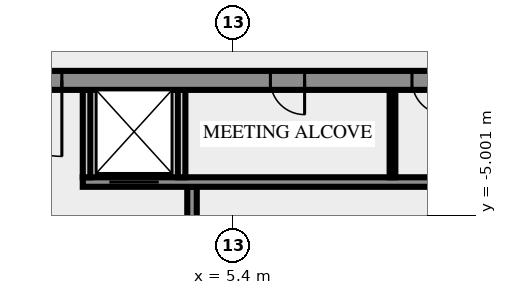
"""IFC4 building model, lengths in metres.
Left out: names, types, materials, properties, quantities, classifications, styles, units other than length and angle.
Written with IfcOpenShell. Run it as: python <this file> out.ifc"""

import sys

from ifc_helpers import new_model, si_unit, direction, frame, frame_2d, origin, place, context, subcontext, project, spatial, rectangle, extrude, element, fill, save


model = new_model("IFC4")
c1 = context("Model", 3, precision=1e-05, world=origin(), true_north=direction((0.0, 1.0)))
c2 = subcontext(c1, "Body", "Model", "MODEL_VIEW")
j1 = project(units=[si_unit("LENGTHUNIT", "METRE"), si_unit("PLANEANGLEUNIT", "RADIAN")], contexts=[c1])
p1 = place(None, origin())
s1 = spatial("IfcSite", under=j1, at=p1, CompositionType="ELEMENT")
p2 = place(p1, origin())
s2 = spatial("IfcBuilding", under=s1, at=p2, CompositionType="ELEMENT")
p3 = place(p2, frame((0.0, 0.0, 269.0)))
s3 = spatial("IfcBuildingStorey", under=s2, at=p3, CompositionType="ELEMENT", Elevation=269.0)
p4 = place(p3, frame((4.325, -7.25, 0.0), z_axis=(0.0, 0.0, 1.0), x_axis=(0.0, 1.0, 0.0)))
e1 = element("IfcWall", 1, at=p4, inside=s3, PredefinedType="SHEAR", context=c2, shape_type="SweptSolid", body=[
    extrude(rectangle(XDim=3.0, YDim=0.25, at=frame_2d((1.5, 0.0))), origin(), (0.0, 0.0, 1.0), 3.5),
])
p5 = place(p4, frame((0.8, 0.0, 0.0)))
e2 = element("IfcOpeningElement", 2, at=p5, cuts=e1, PredefinedType="OPENING", context=c2, shape_type="SweptSolid", body=[
    extrude(rectangle(XDim=1.4, YDim=2.1, at=frame_2d((0.7, 1.05))), frame((0.0, 0.135, 0.0), z_axis=(0.0, -1.0, 0.0), x_axis=(1.0, 0.0, 0.0)), (0.0, 0.0, 1.0), 0.27),
])
p6 = place(p3, frame((1.45, -4.125, 0.0), z_axis=(0.0, 0.0, 1.0), x_axis=(1.0, 0.0, 0.0)))
e3 = element("IfcWall", 3, at=p6, inside=s3, PredefinedType="SHEAR", context=c2, shape_type="SweptSolid", body=[
    extrude(rectangle(XDim=12.9, YDim=0.25, at=frame_2d((6.45, 0.0))), origin(), (0.0, 0.0, 1.0), 3.5),
])
p7 = place(p6, frame((0.7, 0.0, 0.0)))
e4 = element("IfcOpeningElement", 4, at=p7, cuts=e3, PredefinedType="OPENING", context=c2, shape_type="SweptSolid", body=[
    extrude(rectangle(XDim=1.3, YDim=2.1, at=frame_2d((0.65, 1.05))), frame((0.0, 0.135, 0.0), z_axis=(0.0, -1.0, 0.0), x_axis=(1.0, 0.0, 0.0)), (0.0, 0.0, 1.0), 0.27),
])
for number, where, z_axis, x_axis in (
    (5, (1.55, -4.0, 0.0), (0.0, 0.0, 1.0), (0.0, 1.0, 0.0)),
    (6, (4.05, -4.0, 0.0), (0.0, 0.0, 1.0), (0.0, 1.0, 0.0)),
):
    element("IfcWall", number, at=place(p3, frame(where, z_axis=z_axis, x_axis=x_axis)), inside=s3, PredefinedType="SOLIDWALL", context=c2, shape_type="SweptSolid", body=[
        extrude(rectangle(XDim=2.3, YDim=0.2, at=frame_2d((1.15, 0.0))), origin(), (0.0, 0.0, 1.0), 3.5),
    ])
p8 = place(p3, frame((9.6, -4.0, 0.0), z_axis=(0.0, 0.0, 1.0), x_axis=(0.0, 1.0, 0.0)))
e7 = element("IfcWall", 7, at=p8, inside=s3, PredefinedType="PARTITIONING", context=c2, shape_type="SweptSolid", body=[
    extrude(rectangle(XDim=2.3, YDim=0.15, at=frame_2d((1.15, 0.0))), origin(), (0.0, 0.0, 1.0), 3.5),
])
p9 = place(p3, frame((20.49, -1.45, 0.0), z_axis=(0.0, 0.0, 1.0), x_axis=(-1.0, 0.0, 0.0)))
e8 = element("IfcWall", 8, at=p9, inside=s3, PredefinedType="SHEAR", context=c2, shape_type="SweptSolid", body=[
    extrude(rectangle(XDim=40.98, YDim=0.5, at=frame_2d((20.49, 0.0))), origin(), (0.0, 0.0, 1.0), 3.5),
])
p10 = place(p9, frame((38.14, 0.0, 0.0)))
e9 = element("IfcOpeningElement", 9, at=p10, cuts=e8, PredefinedType="OPENING", context=c2, shape_type="SweptSolid", body=[
    extrude(rectangle(XDim=1.8, YDim=2.1, at=frame_2d((0.9, 1.05))), frame((0.0, 0.26, 0.0), z_axis=(0.0, -1.0, 0.0), x_axis=(1.0, 0.0, 0.0)), (0.0, 0.0, 1.0), 0.52),
])
p11 = place(p9, frame((36.728, 0.0, 0.0)))
e10 = element("IfcOpeningElement", 10, at=p11, cuts=e8, PredefinedType="OPENING", context=c2, shape_type="SweptSolid", body=[
    extrude(rectangle(XDim=0.8, YDim=2.1, at=frame_2d((0.4, 1.05))), frame((0.0, 0.26, 0.0), z_axis=(0.0, -1.0, 0.0), x_axis=(1.0, 0.0, 0.0)), (0.0, 0.0, 1.0), 0.52),
])
p12 = place(p9, frame((35.153, 0.0, 0.0)))
e11 = element("IfcOpeningElement", 11, at=p12, cuts=e8, PredefinedType="OPENING", context=c2, shape_type="SweptSolid", body=[
    extrude(rectangle(XDim=0.8, YDim=2.1, at=frame_2d((0.4, 1.05))), frame((0.0, 0.26, 0.0), z_axis=(0.0, -1.0, 0.0), x_axis=(1.0, 0.0, 0.0)), (0.0, 0.0, 1.0), 0.52),
])
p13 = place(p9, frame((32.94, 0.0, 0.0)))
e12 = element("IfcOpeningElement", 12, at=p13, cuts=e8, PredefinedType="OPENING", context=c2, shape_type="SweptSolid", body=[
    extrude(rectangle(XDim=0.9, YDim=2.1, at=frame_2d((0.45, 1.05))), frame((0.0, 0.26, 0.0), z_axis=(0.0, -1.0, 0.0), x_axis=(1.0, 0.0, 0.0)), (0.0, 0.0, 1.0), 0.52),
])
p14 = place(p9, frame((31.015, 0.0, 0.0)))
e13 = element("IfcOpeningElement", 13, at=p14, cuts=e8, PredefinedType="OPENING", context=c2, shape_type="SweptSolid", body=[
    extrude(rectangle(XDim=0.8, YDim=2.1, at=frame_2d((0.4, 1.05))), frame((0.0, 0.26, 0.0), z_axis=(0.0, -1.0, 0.0), x_axis=(1.0, 0.0, 0.0)), (0.0, 0.0, 1.0), 0.52),
])
p15 = place(p9, frame((24.765, 0.0, 0.0)))
e14 = element("IfcOpeningElement", 14, at=p15, cuts=e8, PredefinedType="OPENING", context=c2, shape_type="SweptSolid", body=[
    extrude(rectangle(XDim=0.8, YDim=2.1, at=frame_2d((0.4, 1.05))), frame((0.0, 0.26, 0.0), z_axis=(0.0, -1.0, 0.0), x_axis=(1.0, 0.0, 0.0)), (0.0, 0.0, 1.0), 0.52),
])
p16 = place(p9, frame((19.59, 0.0, 0.0)))
e15 = element("IfcOpeningElement", 15, at=p16, cuts=e8, PredefinedType="OPENING", context=c2, shape_type="SweptSolid", body=[
    extrude(rectangle(XDim=2.0, YDim=2.1, at=frame_2d((1.0, 1.05))), frame((0.0, 0.26, 0.0), z_axis=(0.0, -1.0, 0.0), x_axis=(1.0, 0.0, 0.0)), (0.0, 0.0, 1.0), 0.52),
])
p17 = place(p9, frame((13.202, 0.0, 0.0)))
e16 = element("IfcOpeningElement", 16, at=p17, cuts=e8, PredefinedType="OPENING", context=c2, shape_type="SweptSolid", body=[
    extrude(rectangle(XDim=0.9, YDim=2.1, at=frame_2d((0.45, 1.05))), frame((0.0, 0.26, 0.0), z_axis=(0.0, -1.0, 0.0), x_axis=(1.0, 0.0, 0.0)), (0.0, 0.0, 1.0), 0.52),
])
p18 = place(p9, frame((9.478, 0.0, 0.0)))
e17 = element("IfcOpeningElement", 17, at=p18, cuts=e8, PredefinedType="OPENING", context=c2, shape_type="SweptSolid", body=[
    extrude(rectangle(XDim=0.9, YDim=2.1, at=frame_2d((0.45, 1.05))), frame((0.0, 0.26, 0.0), z_axis=(0.0, -1.0, 0.0), x_axis=(1.0, 0.0, 0.0)), (0.0, 0.0, 1.0), 0.52),
])
p19 = place(p9, frame((7.14, 0.0, 0.0)))
e18 = element("IfcOpeningElement", 18, at=p19, cuts=e8, PredefinedType="OPENING", context=c2, shape_type="SweptSolid", body=[
    extrude(rectangle(XDim=0.9, YDim=2.1, at=frame_2d((0.45, 1.05))), frame((0.0, 0.26, 0.0), z_axis=(0.0, -1.0, 0.0), x_axis=(1.0, 0.0, 0.0)), (0.0, 0.0, 1.0), 0.52),
])
p20 = place(p9, frame((4.19, 0.0, 0.0)))
e19 = element("IfcOpeningElement", 19, at=p20, cuts=e8, PredefinedType="OPENING", context=c2, shape_type="SweptSolid", body=[
    extrude(rectangle(XDim=0.9, YDim=2.1, at=frame_2d((0.45, 1.05))), frame((0.0, 0.26, 0.0), z_axis=(0.0, -1.0, 0.0), x_axis=(1.0, 0.0, 0.0)), (0.0, 0.0, 1.0), 0.52),
])
p21 = place(p9, frame((1.04, 0.0, 0.0)))
e20 = element("IfcOpeningElement", 20, at=p21, cuts=e8, PredefinedType="OPENING", context=c2, shape_type="SweptSolid", body=[
    extrude(rectangle(XDim=1.8, YDim=2.1, at=frame_2d((0.9, 1.05))), frame((0.0, 0.26, 0.0), z_axis=(0.0, -1.0, 0.0), x_axis=(1.0, 0.0, 0.0)), (0.0, 0.0, 1.0), 0.52),
])
p22 = place(p7, origin())
e21 = element("IfcDoor", 21, at=p22, inside=s3, OperationType="DOUBLE_DOOR_SLIDING", PredefinedType="DOOR", context=c2, shape_type="SweptSolid", body=[
    extrude(rectangle(XDim=1.3, YDim=2.1, at=frame_2d((0.65, 1.05))), frame((0.0, 0.025, 0.0), z_axis=(0.0, -1.0, 0.0), x_axis=(1.0, 0.0, 0.0)), (0.0, 0.0, 1.0), 0.05),
])
fill(e4, e21)
p23 = place(p16, origin())
e22 = element("IfcDoor", 22, at=p23, inside=s3, OperationType="DOUBLE_DOOR_SINGLE_SWING", PredefinedType="DOOR", context=c2, shape_type="SweptSolid", body=[
    extrude(rectangle(XDim=2.0, YDim=2.1, at=frame_2d((1.0, 1.05))), frame((0.0, 0.025, 0.0), z_axis=(0.0, -1.0, 0.0), x_axis=(1.0, 0.0, 0.0)), (0.0, 0.0, 1.0), 0.05),
])
fill(e15, e22)
p24 = place(p17, origin())
e23 = element("IfcDoor", 23, at=p24, inside=s3, OperationType="SINGLE_SWING_LEFT", PredefinedType="DOOR", context=c2, shape_type="SweptSolid", body=[
    extrude(rectangle(XDim=0.9, YDim=2.1, at=frame_2d((0.45, 1.05))), frame((0.0, 0.025, 0.0), z_axis=(0.0, -1.0, 0.0), x_axis=(1.0, 0.0, 0.0)), (0.0, 0.0, 1.0), 0.05),
])
fill(e16, e23)
p25 = place(p18, origin())
e24 = element("IfcDoor", 24, at=p25, inside=s3, OperationType="SINGLE_SWING_LEFT", PredefinedType="DOOR", context=c2, shape_type="SweptSolid", body=[
    extrude(rectangle(XDim=0.9, YDim=2.1, at=frame_2d((0.45, 1.05))), frame((0.0, 0.025, 0.0), z_axis=(0.0, -1.0, 0.0), x_axis=(1.0, 0.0, 0.0)), (0.0, 0.0, 1.0), 0.05),
])
fill(e17, e24)
save(model, sys.argv[1])
